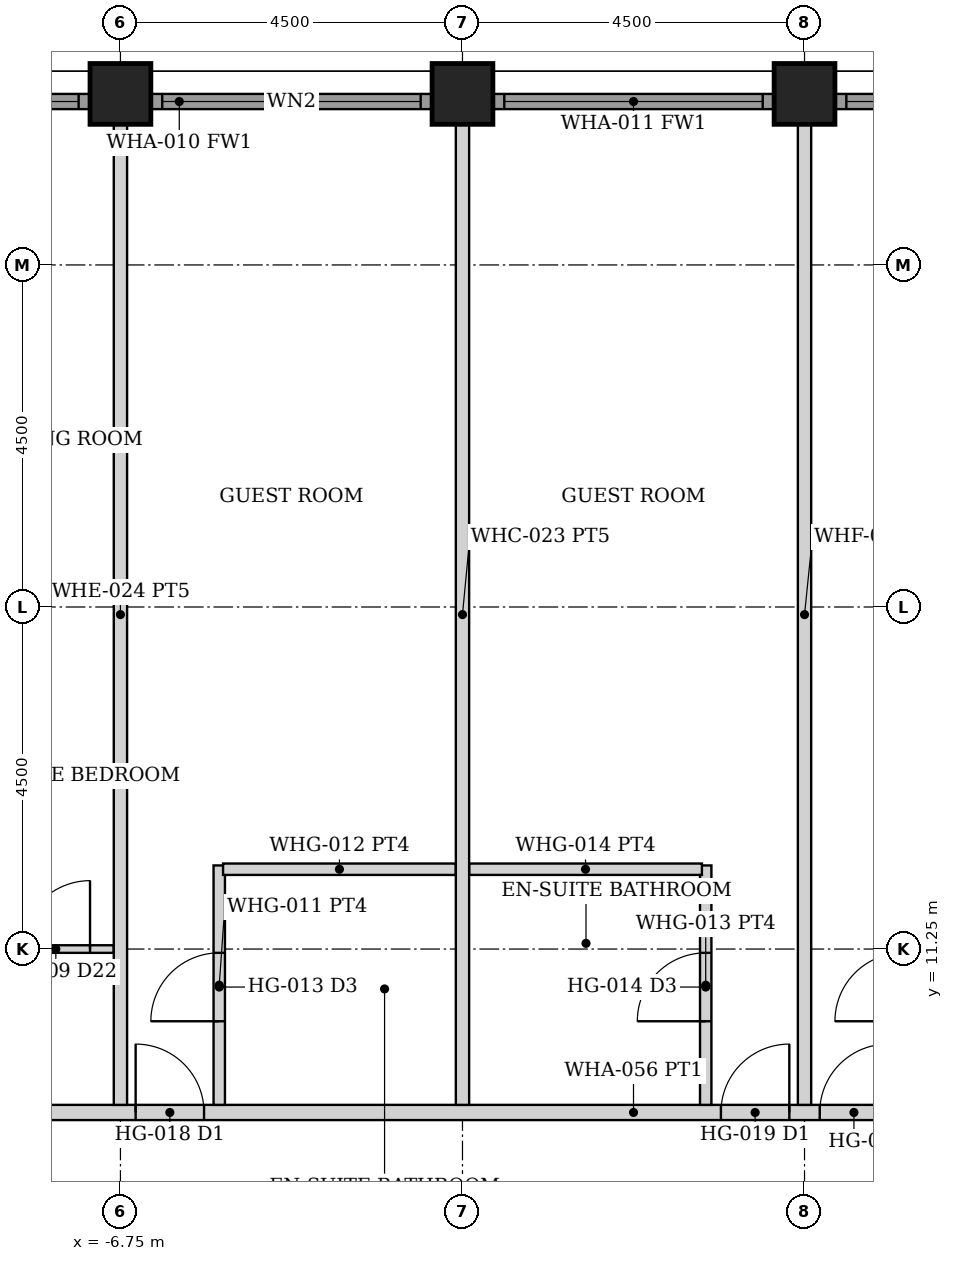
"""IFC4 building model, lengths in metres.
Left out: names, types, materials, properties, quantities, classifications, styles, units other than length and angle.
Written with IfcOpenShell. Run it as: python <this file> out.ifc"""

import sys

from ifc_helpers import new_model, si_unit, direction, frame, frame_2d, origin, origin_2d, place, context, subcontext, project, spatial, rectangle, hollow_rectangle, extrude, element, fill, save


model = new_model("IFC4")
c1 = context("Model", 3, precision=1e-05, world=origin(), true_north=direction((0.0, 1.0)))
c2 = subcontext(c1, "Body", "Model", "MODEL_VIEW")
j1 = project(units=[si_unit("LENGTHUNIT", "METRE"), si_unit("PLANEANGLEUNIT", "RADIAN")], contexts=[c1])
p1 = place(None, origin())
s1 = spatial("IfcSite", under=j1, at=p1, CompositionType="ELEMENT")
p2 = place(p1, origin())
s2 = spatial("IfcBuilding", under=s1, at=p2, CompositionType="ELEMENT")
p3 = place(p2, frame((0.0, 0.0, 183.2)))
s3 = spatial("IfcBuildingStorey", under=s2, at=p3, CompositionType="ELEMENT", Elevation=183.2)
for number, where, z_axis, x_axis in (
    (1, (-6.75, 22.5, 0.0), (0.0, 0.0, 1.0), (0.0, 1.0, 0.0)),
    (2, (-2.25, 22.5, 0.0), (0.0, 0.0, 1.0), (0.0, 1.0, 0.0)),
    (3, (2.25, 22.5, 0.0), (0.0, 0.0, 1.0), (0.0, 1.0, 0.0)),
):
    element("IfcColumn", number, at=place(p3, frame(where, z_axis=z_axis, x_axis=x_axis)), inside=s3, PredefinedType="COLUMN", context=c2, shape_type="SweptSolid", body=[
        extrude(hollow_rectangle(XDim=0.8, YDim=0.8, WallThickness=0.045, at=origin_2d()), origin(), (0.0, 0.0, 1.0), 3.6),
    ])
p4 = place(p3, frame((-10.845, 22.4, 0.0), z_axis=(0.0, 0.0, 1.0), x_axis=(1.0, 0.0, 0.0)))
e4 = element("IfcWall", 4, at=p4, inside=s3, PredefinedType="SOLIDWALL", context=c2, shape_type="SweptSolid", body=[
    extrude(rectangle(XDim=3.69, YDim=0.2, at=frame_2d((1.845, 0.0))), origin(), (0.0, 0.0, 1.0), 2.479),
])
p5 = place(p4, frame((0.145, 0.0, 0.3)))
e5 = element("IfcOpeningElement", 5, at=p5, cuts=e4, PredefinedType="OPENING", context=c2, shape_type="SweptSolid", body=[
    extrude(rectangle(XDim=3.4, YDim=2.029, at=frame_2d((1.7, 1.015))), frame((0.0, 0.11, 0.0), z_axis=(0.0, -1.0, 0.0), x_axis=(1.0, 0.0, 0.0)), (0.0, 0.0, 1.0), 0.22),
])
p6 = place(p3, frame((-6.345, 22.4, 0.0), z_axis=(0.0, 0.0, 1.0), x_axis=(1.0, 0.0, 0.0)))
e6 = element("IfcWall", 6, at=p6, inside=s3, PredefinedType="SOLIDWALL", context=c2, shape_type="SweptSolid", body=[
    extrude(rectangle(XDim=3.69, YDim=0.2, at=frame_2d((1.845, 0.0))), origin(), (0.0, 0.0, 1.0), 2.479),
])
p7 = place(p6, frame((0.145, 0.0, 0.3)))
e7 = element("IfcOpeningElement", 7, at=p7, cuts=e6, PredefinedType="OPENING", context=c2, shape_type="SweptSolid", body=[
    extrude(rectangle(XDim=3.4, YDim=2.029, at=frame_2d((1.7, 1.015))), frame((0.0, 0.11, 0.0), z_axis=(0.0, -1.0, 0.0), x_axis=(1.0, 0.0, 0.0)), (0.0, 0.0, 1.0), 0.22),
])
p8 = place(p3, frame((-1.845, 22.4, 0.0), z_axis=(0.0, 0.0, 1.0), x_axis=(1.0, 0.0, 0.0)))
e8 = element("IfcWall", 8, at=p8, inside=s3, PredefinedType="SOLIDWALL", context=c2, shape_type="SweptSolid", body=[
    extrude(rectangle(XDim=3.69, YDim=0.2, at=frame_2d((1.845, 0.0))), origin(), (0.0, 0.0, 1.0), 2.479),
])
p9 = place(p8, frame((0.145, 0.0, 0.3)))
e9 = element("IfcOpeningElement", 9, at=p9, cuts=e8, PredefinedType="OPENING", context=c2, shape_type="SweptSolid", body=[
    extrude(rectangle(XDim=3.4, YDim=2.029, at=frame_2d((1.7, 1.015))), frame((0.0, 0.11, 0.0), z_axis=(0.0, -1.0, 0.0), x_axis=(1.0, 0.0, 0.0)), (0.0, 0.0, 1.0), 0.22),
])
p10 = place(p3, frame((2.655, 22.4, 0.0), z_axis=(0.0, 0.0, 1.0), x_axis=(1.0, 0.0, 0.0)))
e10 = element("IfcWall", 10, at=p10, inside=s3, PredefinedType="SOLIDWALL", context=c2, shape_type="SweptSolid", body=[
    extrude(rectangle(XDim=3.69, YDim=0.2, at=frame_2d((1.845, 0.0))), origin(), (0.0, 0.0, 1.0), 2.479),
])
p11 = place(p10, frame((0.145, 0.0, 0.3)))
e11 = element("IfcOpeningElement", 11, at=p11, cuts=e10, PredefinedType="OPENING", context=c2, shape_type="SweptSolid", body=[
    extrude(rectangle(XDim=3.4, YDim=2.029, at=frame_2d((1.7, 1.015))), frame((0.0, 0.11, 0.0), z_axis=(0.0, -1.0, 0.0), x_axis=(1.0, 0.0, 0.0)), (0.0, 0.0, 1.0), 0.22),
])
p12 = place(p3, frame((-22.3, 9.1, 0.0), z_axis=(0.0, 0.0, 1.0), x_axis=(1.0, 0.0, 0.0)))
e12 = element("IfcWall", 12, at=p12, inside=s3, PredefinedType="PARTITIONING", context=c2, shape_type="SweptSolid", body=[
    extrude(rectangle(XDim=44.6, YDim=0.2, at=frame_2d((22.3, 0.0))), origin(), (0.0, 0.0, 1.0), 2.473),
])
p13 = place(p12, frame((11.35, 0.0, 0.0)))
e13 = element("IfcOpeningElement", 13, at=p13, cuts=e12, PredefinedType="OPENING", context=c2, shape_type="SweptSolid", body=[
    extrude(rectangle(XDim=0.9, YDim=2.1, at=frame_2d((0.45, 1.05))), frame((0.0, 0.11, 0.0), z_axis=(0.0, -1.0, 0.0), x_axis=(1.0, 0.0, 0.0)), (0.0, 0.0, 1.0), 0.22),
])
p14 = place(p12, frame((15.75, 0.0, 0.0)))
e14 = element("IfcOpeningElement", 14, at=p14, cuts=e12, PredefinedType="OPENING", context=c2, shape_type="SweptSolid", body=[
    extrude(rectangle(XDim=0.9, YDim=2.1, at=frame_2d((0.45, 1.05))), frame((0.0, 0.11, 0.0), z_axis=(0.0, -1.0, 0.0), x_axis=(1.0, 0.0, 0.0)), (0.0, 0.0, 1.0), 0.22),
])
p15 = place(p12, frame((23.45, 0.0, 0.0)))
e15 = element("IfcOpeningElement", 15, at=p15, cuts=e12, PredefinedType="OPENING", context=c2, shape_type="SweptSolid", body=[
    extrude(rectangle(XDim=0.9, YDim=2.1, at=frame_2d((0.45, 1.05))), frame((0.0, 0.11, 0.0), z_axis=(0.0, -1.0, 0.0), x_axis=(1.0, 0.0, 0.0)), (0.0, 0.0, 1.0), 0.22),
])
p16 = place(p12, frame((24.75, 0.0, 0.0)))
e16 = element("IfcOpeningElement", 16, at=p16, cuts=e12, PredefinedType="OPENING", context=c2, shape_type="SweptSolid", body=[
    extrude(rectangle(XDim=0.9, YDim=2.1, at=frame_2d((0.45, 1.05))), frame((0.0, 0.11, 0.0), z_axis=(0.0, -1.0, 0.0), x_axis=(1.0, 0.0, 0.0)), (0.0, 0.0, 1.0), 0.22),
])
p17 = place(p12, frame((29.35, 0.0, 0.0)))
e17 = element("IfcOpeningElement", 17, at=p17, cuts=e12, PredefinedType="OPENING", context=c2, shape_type="SweptSolid", body=[
    extrude(rectangle(XDim=0.9, YDim=2.1, at=frame_2d((0.45, 1.05))), frame((0.0, 0.11, 0.0), z_axis=(0.0, -1.0, 0.0), x_axis=(1.0, 0.0, 0.0)), (0.0, 0.0, 1.0), 0.22),
])
p18 = place(p12, frame((38.85, 0.0, 0.0)))
e18 = element("IfcOpeningElement", 18, at=p18, cuts=e12, PredefinedType="OPENING", context=c2, shape_type="SweptSolid", body=[
    extrude(rectangle(XDim=0.9, YDim=2.1, at=frame_2d((0.45, 1.05))), frame((0.0, 0.11, 0.0), z_axis=(0.0, -1.0, 0.0), x_axis=(1.0, 0.0, 0.0)), (0.0, 0.0, 1.0), 0.22),
])
p19 = place(p12, frame((4.85, 0.0, 0.0)))
e19 = element("IfcOpeningElement", 19, at=p19, cuts=e12, PredefinedType="OPENING", context=c2, shape_type="SweptSolid", body=[
    extrude(rectangle(XDim=0.9, YDim=2.1, at=frame_2d((0.45, 1.05))), frame((0.0, 0.11, 0.0), z_axis=(0.0, -1.0, 0.0), x_axis=(1.0, 0.0, 0.0)), (0.0, 0.0, 1.0), 0.22),
])
p20 = place(p3, frame((-15.663, 11.25, 0.0), z_axis=(0.0, 0.0, 1.0), x_axis=(1.0, 0.0, 0.0)))
e20 = element("IfcWall", 20, at=p20, inside=s3, PredefinedType="PARTITIONING", context=c2, shape_type="SweptSolid", body=[
    extrude(rectangle(XDim=8.825, YDim=0.1, at=frame_2d((4.413, 0.0))), origin(), (0.0, 0.0, 1.0), 2.473),
])
p21 = place(p20, frame((5.363, 0.0, 0.0)))
e21 = element("IfcOpeningElement", 21, at=p21, cuts=e20, PredefinedType="OPENING", context=c2, shape_type="SweptSolid", body=[
    extrude(rectangle(XDim=0.9, YDim=2.1, at=frame_2d((0.45, 1.05))), frame((0.0, 0.06, 0.0), z_axis=(0.0, -1.0, 0.0), x_axis=(1.0, 0.0, 0.0)), (0.0, 0.0, 1.0), 0.12),
])
p22 = place(p20, frame((7.613, 0.0, 0.0)))
e22 = element("IfcOpeningElement", 22, at=p22, cuts=e20, PredefinedType="OPENING", context=c2, shape_type="SweptSolid", body=[
    extrude(rectangle(XDim=0.9, YDim=2.1, at=frame_2d((0.45, 1.05))), frame((0.0, 0.06, 0.0), z_axis=(0.0, -1.0, 0.0), x_axis=(1.0, 0.0, 0.0)), (0.0, 0.0, 1.0), 0.12),
])
p23 = place(p20, frame((3.337, 0.0, 0.0)))
e23 = element("IfcOpeningElement", 23, at=p23, cuts=e20, PredefinedType="OPENING", context=c2, shape_type="SweptSolid", body=[
    extrude(rectangle(XDim=0.85, YDim=2.1, at=frame_2d((0.425, 1.05))), frame((0.0, 0.06, 0.0), z_axis=(0.0, -1.0, 0.0), x_axis=(1.0, 0.0, 0.0)), (0.0, 0.0, 1.0), 0.12),
])
p24 = place(p3, frame((-5.45, 9.2, 0.0), z_axis=(0.0, 0.0, 1.0), x_axis=(0.0, 1.0, 0.0)))
e24 = element("IfcWall", 24, at=p24, inside=s3, PredefinedType="PARTITIONING", context=c2, shape_type="SweptSolid", body=[
    extrude(rectangle(XDim=3.15, YDim=0.15, at=frame_2d((1.575, 0.0))), origin(), (0.0, 0.0, 1.0), 2.473),
])
p25 = place(p24, frame((1.1, 0.0, 0.0)))
e25 = element("IfcOpeningElement", 25, at=p25, cuts=e24, PredefinedType="OPENING", context=c2, shape_type="SweptSolid", body=[
    extrude(rectangle(XDim=0.9, YDim=2.1, at=frame_2d((0.45, 1.05))), frame((0.0, 0.085, 0.0), z_axis=(0.0, -1.0, 0.0), x_axis=(1.0, 0.0, 0.0)), (0.0, 0.0, 1.0), 0.17),
])
p26 = place(p3, frame((-5.4, 12.3, 0.0), z_axis=(0.0, 0.0, 1.0), x_axis=(1.0, 0.0, 0.0)))
e26 = element("IfcWall", 26, at=p26, inside=s3, PredefinedType="PARTITIONING", context=c2, shape_type="SweptSolid", body=[
    extrude(rectangle(XDim=3.062, YDim=0.15, at=frame_2d((1.531, 0.0))), origin(), (0.0, 0.0, 1.0), 2.473),
])
p27 = place(p3, frame((0.95, 9.2, 0.0), z_axis=(0.0, 0.0, 1.0), x_axis=(0.0, 1.0, 0.0)))
e27 = element("IfcWall", 27, at=p27, inside=s3, PredefinedType="PARTITIONING", context=c2, shape_type="SweptSolid", body=[
    extrude(rectangle(XDim=3.15, YDim=0.15, at=frame_2d((1.575, 0.0))), origin(), (0.0, 0.0, 1.0), 2.473),
])
p28 = place(p27, frame((1.1, 0.0, 0.0)))
e28 = element("IfcOpeningElement", 28, at=p28, cuts=e27, PredefinedType="OPENING", context=c2, shape_type="SweptSolid", body=[
    extrude(rectangle(XDim=0.9, YDim=2.1, at=frame_2d((0.45, 1.05))), frame((0.0, 0.085, 0.0), z_axis=(0.0, -1.0, 0.0), x_axis=(1.0, 0.0, 0.0)), (0.0, 0.0, 1.0), 0.17),
])
p29 = place(p3, frame((-2.163, 12.3, 0.0), z_axis=(0.0, 0.0, 1.0), x_axis=(1.0, 0.0, 0.0)))
e29 = element("IfcWall", 29, at=p29, inside=s3, PredefinedType="PARTITIONING", context=c2, shape_type="SweptSolid", body=[
    extrude(rectangle(XDim=3.062, YDim=0.15, at=frame_2d((1.531, 0.0))), origin(), (0.0, 0.0, 1.0), 2.473),
])
for number, where, z_axis, x_axis in (
    (30, (-6.75, 9.2, 0.0), (0.0, 0.0, 1.0), (0.0, 1.0, 0.0)),
    (31, (-2.25, 9.2, 0.0), (0.0, 0.0, 1.0), (0.0, 1.0, 0.0)),
    (32, (2.25, 9.2, 0.0), (0.0, 0.0, 1.0), (0.0, 1.0, 0.0)),
):
    element("IfcWall", number, at=place(p3, frame(where, z_axis=z_axis, x_axis=x_axis)), inside=s3, PredefinedType="PARTITIONING", context=c2, shape_type="SweptSolid", body=[
        extrude(rectangle(XDim=12.9, YDim=0.175, at=frame_2d((6.45, 0.0))), origin(), (0.0, 0.0, 1.0), 2.473),
    ])
p30 = place(p5, origin())
e33 = element("IfcWindow", 33, at=p30, inside=s3, PartitioningType="SINGLE_PANEL", PredefinedType="WINDOW", context=c2, shape_type="SweptSolid", body=[
    extrude(rectangle(XDim=3.4, YDim=2.029, at=frame_2d((1.7, 1.015))), frame((0.0, 0.03, 0.0), z_axis=(0.0, -1.0, 0.0), x_axis=(1.0, 0.0, 0.0)), (0.0, 0.0, 1.0), 0.06),
])
fill(e5, e33)
p31 = place(p7, origin())
e34 = element("IfcWindow", 34, at=p31, inside=s3, PartitioningType="SINGLE_PANEL", PredefinedType="WINDOW", context=c2, shape_type="SweptSolid", body=[
    extrude(rectangle(XDim=3.4, YDim=2.029, at=frame_2d((1.7, 1.015))), frame((0.0, 0.03, 0.0), z_axis=(0.0, -1.0, 0.0), x_axis=(1.0, 0.0, 0.0)), (0.0, 0.0, 1.0), 0.06),
])
fill(e7, e34)
p32 = place(p9, origin())
e35 = element("IfcWindow", 35, at=p32, inside=s3, PartitioningType="SINGLE_PANEL", PredefinedType="WINDOW", context=c2, shape_type="SweptSolid", body=[
    extrude(rectangle(XDim=3.4, YDim=2.029, at=frame_2d((1.7, 1.015))), frame((0.0, 0.03, 0.0), z_axis=(0.0, -1.0, 0.0), x_axis=(1.0, 0.0, 0.0)), (0.0, 0.0, 1.0), 0.06),
])
fill(e9, e35)
p33 = place(p11, origin())
e36 = element("IfcWindow", 36, at=p33, inside=s3, PartitioningType="SINGLE_PANEL", PredefinedType="WINDOW", context=c2, shape_type="SweptSolid", body=[
    extrude(rectangle(XDim=3.4, YDim=2.029, at=frame_2d((1.7, 1.015))), frame((0.0, 0.03, 0.0), z_axis=(0.0, -1.0, 0.0), x_axis=(1.0, 0.0, 0.0)), (0.0, 0.0, 1.0), 0.06),
])
fill(e11, e36)
p34 = place(p22, origin())
e37 = element("IfcDoor", 37, at=p34, inside=s3, OperationType="SINGLE_SWING_RIGHT", PredefinedType="DOOR", context=c2, shape_type="SweptSolid", body=[
    extrude(rectangle(XDim=0.9, YDim=2.1, at=frame_2d((0.45, 1.05))), frame((0.0, 0.025, 0.0), z_axis=(0.0, -1.0, 0.0), x_axis=(1.0, 0.0, 0.0)), (0.0, 0.0, 1.0), 0.05),
])
fill(e22, e37)
p35 = place(p14, origin())
e38 = element("IfcDoor", 38, at=p35, inside=s3, OperationType="SINGLE_SWING_LEFT", PredefinedType="DOOR", context=c2, shape_type="SweptSolid", body=[
    extrude(rectangle(XDim=0.9, YDim=2.1, at=frame_2d((0.45, 1.05))), frame((0.0, 0.025, 0.0), z_axis=(0.0, -1.0, 0.0), x_axis=(1.0, 0.0, 0.0)), (0.0, 0.0, 1.0), 0.05),
])
fill(e14, e38)
p36 = place(p25, origin())
e39 = element("IfcDoor", 39, at=p36, inside=s3, OperationType="SINGLE_SWING_LEFT", PredefinedType="DOOR", context=c2, shape_type="SweptSolid", body=[
    extrude(rectangle(XDim=0.9, YDim=2.1, at=frame_2d((0.45, 1.05))), frame((0.0, 0.025, 0.0), z_axis=(0.0, -1.0, 0.0), x_axis=(1.0, 0.0, 0.0)), (0.0, 0.0, 1.0), 0.05),
])
fill(e25, e39)
p37 = place(p15, origin())
e40 = element("IfcDoor", 40, at=p37, inside=s3, OperationType="SINGLE_SWING_RIGHT", PredefinedType="DOOR", context=c2, shape_type="SweptSolid", body=[
    extrude(rectangle(XDim=0.9, YDim=2.1, at=frame_2d((0.45, 1.05))), frame((0.0, 0.025, 0.0), z_axis=(0.0, -1.0, 0.0), x_axis=(1.0, 0.0, 0.0)), (0.0, 0.0, 1.0), 0.05),
])
fill(e15, e40)
p38 = place(p28, origin())
e41 = element("IfcDoor", 41, at=p38, inside=s3, OperationType="SINGLE_SWING_LEFT", PredefinedType="DOOR", context=c2, shape_type="SweptSolid", body=[
    extrude(rectangle(XDim=0.9, YDim=2.1, at=frame_2d((0.45, 1.05))), frame((0.0, 0.025, 0.0), z_axis=(0.0, -1.0, 0.0), x_axis=(1.0, 0.0, 0.0)), (0.0, 0.0, 1.0), 0.05),
])
fill(e28, e41)
p39 = place(p16, origin())
e42 = element("IfcDoor", 42, at=p39, inside=s3, OperationType="SINGLE_SWING_RIGHT", PredefinedType="DOOR", context=c2, shape_type="SweptSolid", body=[
    extrude(rectangle(XDim=0.9, YDim=2.1, at=frame_2d((0.45, 1.05))), frame((0.0, 0.025, 0.0), z_axis=(0.0, -1.0, 0.0), x_axis=(1.0, 0.0, 0.0)), (0.0, 0.0, 1.0), 0.05),
])
fill(e16, e42)
save(model, sys.argv[1])
